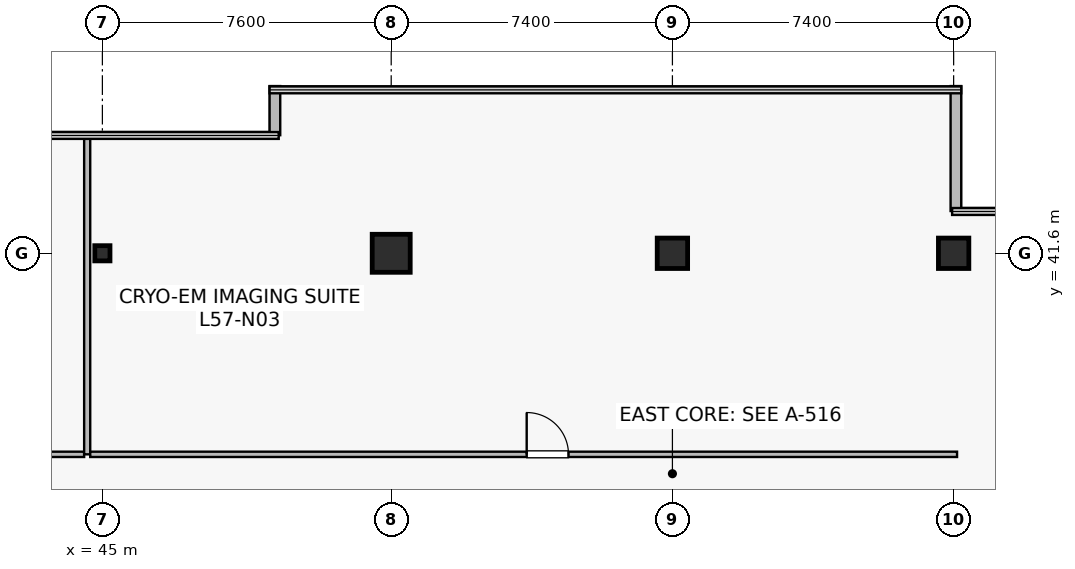
"""IFC4 building model, lengths in metres.
Left out: names, types, materials, properties, quantities, classifications, styles, units other than length and angle.
Written with IfcOpenShell. Run it as: python <this file> out.ifc"""

import sys

from ifc_helpers import new_model, si_unit, direction, frame, frame_2d, origin, origin_2d, place, context, subcontext, project, spatial, rectangle, hollow_rectangle, extrude, source, transform, mapped, element, fill, save


model = new_model("IFC4")
c1 = context("Model", 3, precision=1e-05, world=origin(), true_north=direction((0.0, 1.0)))
c2 = subcontext(c1, "Body", "Model", "MODEL_VIEW")
j1 = project(units=[si_unit("LENGTHUNIT", "METRE"), si_unit("PLANEANGLEUNIT", "RADIAN")], contexts=[c1])
p1 = place(None, origin())
s1 = spatial("IfcSite", under=j1, at=p1, CompositionType="ELEMENT")
p2 = place(p1, origin())
s2 = spatial("IfcBuilding", under=s1, at=p2, CompositionType="ELEMENT")
p3 = place(p2, frame((0.0, 0.0, 238.3)))
s3 = spatial("IfcBuildingStorey", under=s2, at=p3, CompositionType="ELEMENT", Elevation=238.3)
m1 = source(origin(), c2, "Body", "SweptSolid", [
    extrude(rectangle(XDim=1.0, YDim=1.0, at=origin_2d()), origin(), (0.0, 0.0, 1.0), 4.1),
])
p4 = place(p3, frame((52.6, 41.6, 0.0), z_axis=(0.0, 0.0, 1.0), x_axis=(1.0, 0.0, 0.0)))
e1 = element("IfcColumn", 1, at=p4, inside=s3, PredefinedType="COLUMN", context=c2, shape_type="MappedRepresentation", body=[
    mapped(m1, transform((0.0, 0.0, 0.0), scale=1.0)),
])
m2 = source(origin(), c2, "Body", "SweptSolid", [
    extrude(rectangle(XDim=0.8, YDim=0.8, at=origin_2d()), origin(), (0.0, 0.0, 1.0), 4.1),
])
for number, where, z_axis, x_axis in (
    (2, (60.0, 41.6, 0.0), (0.0, 0.0, 1.0), (1.0, 0.0, 0.0)),
    (3, (67.4, 41.6, 0.0), (0.0, 0.0, 1.0), (1.0, 0.0, 0.0)),
):
    element("IfcColumn", number, at=place(p3, frame(where, z_axis=z_axis, x_axis=x_axis)), inside=s3, PredefinedType="COLUMN", context=c2, shape_type="MappedRepresentation", body=[
        mapped(m2, transform((0.0, 0.0, 0.0), scale=1.0)),
    ])
m3 = source(origin(), c2, "Body", "SweptSolid", [
    extrude(hollow_rectangle(XDim=0.4, YDim=0.4, WallThickness=0.019, at=origin_2d()), origin(), (0.0, 0.0, 1.0), 4.1),
])
p5 = place(p3, frame((45.0, 41.6, 0.0), z_axis=(0.0, 0.0, 1.0), x_axis=(1.0, 0.0, 0.0)))
e4 = element("IfcColumn", 4, at=p5, inside=s3, PredefinedType="COLUMN", context=c2, shape_type="MappedRepresentation", body=[
    mapped(m3, transform((0.0, 0.0, 0.0), scale=1.0)),
])
p6 = place(p3, frame((67.46, 42.712, 0.0), z_axis=(0.0, 0.0, 1.0), x_axis=(0.0, 1.0, 0.0)))
e5 = element("IfcWall", 5, at=p6, inside=s3, PredefinedType="STANDARD", context=c2, shape_type="SweptSolid", body=[
    extrude(rectangle(XDim=3.288, YDim=0.28, at=frame_2d((1.644, 0.0))), origin(), (0.0, 0.0, 1.0), 3.8),
])
p7 = place(p3, frame((49.54, 46.0, 0.0), z_axis=(0.0, 0.0, 1.0), x_axis=(0.0, -1.0, 0.0)))
e6 = element("IfcWall", 6, at=p7, inside=s3, PredefinedType="STANDARD", context=c2, shape_type="SweptSolid", body=[
    extrude(rectangle(XDim=1.293, YDim=0.28, at=frame_2d((0.646, 0.0))), origin(), (0.0, 0.0, 1.0), 3.8),
])
p8 = place(p3, frame((21.28, 36.31, 0.0), z_axis=(0.0, 0.0, 1.0), x_axis=(1.0, 0.0, 0.0)))
e7 = element("IfcWall", 7, at=p8, inside=s3, PredefinedType="PARTITIONING", context=c2, shape_type="SweptSolid", body=[
    extrude(rectangle(XDim=23.24, YDim=0.14, at=frame_2d((11.62, 0.0))), origin(), (0.0, 0.0, 1.0), 3.197),
])
p9 = place(p8, frame((9.14, 0.0, 0.0)))
e8 = element("IfcOpeningElement", 8, at=p9, cuts=e7, PredefinedType="OPENING", context=c2, shape_type="SweptSolid", body=[
    extrude(rectangle(XDim=1.1, YDim=2.18, at=frame_2d((0.55, 1.09))), frame((0.0, 0.08, 0.0), z_axis=(0.0, -1.0, 0.0), x_axis=(1.0, 0.0, 0.0)), (0.0, 0.0, 1.0), 0.16),
])
p10 = place(p3, frame((44.6, 36.31, 0.0), z_axis=(0.0, 0.0, 1.0), x_axis=(0.0, 1.0, 0.0)))
e9 = element("IfcWall", 9, at=p10, inside=s3, PredefinedType="PARTITIONING", context=c2, shape_type="SweptSolid", body=[
    extrude(rectangle(XDim=8.38, YDim=0.16, at=frame_2d((4.19, 0.0))), origin(), (0.0, 0.0, 1.0), 3.135),
])
p11 = place(p3, frame((44.68, 36.31, 0.0), z_axis=(0.0, 0.0, 1.0), x_axis=(1.0, 0.0, 0.0)))
e10 = element("IfcWall", 10, at=p11, inside=s3, PredefinedType="PARTITIONING", context=c2, shape_type="SweptSolid", body=[
    extrude(rectangle(XDim=22.81, YDim=0.14, at=frame_2d((11.405, 0.0))), origin(), (0.0, 0.0, 1.0), 3.197),
])
p12 = place(p11, frame((11.485, 0.0, 0.0)))
e11 = element("IfcOpeningElement", 11, at=p12, cuts=e10, PredefinedType="OPENING", context=c2, shape_type="SweptSolid", body=[
    extrude(rectangle(XDim=1.1, YDim=2.18, at=frame_2d((0.55, 1.09))), frame((0.0, 0.08, 0.0), z_axis=(0.0, -1.0, 0.0), x_axis=(1.0, 0.0, 0.0)), (0.0, 0.0, 1.0), 0.16),
])
m4 = source(origin(), c2, "Body", "SweptSolid", [
    extrude(rectangle(XDim=1.1, YDim=2.18, at=frame_2d((0.55, 1.09))), frame((0.0, 0.025, 0.0), z_axis=(0.0, -1.0, 0.0), x_axis=(1.0, 0.0, 0.0)), (0.0, 0.0, 1.0), 0.05),
])
p13 = place(p12, origin())
e12 = element("IfcDoor", 12, at=p13, inside=s3, OperationType="SINGLE_SWING_LEFT", PredefinedType="DOOR", context=c2, shape_type="MappedRepresentation", body=[
    mapped(m4, transform((0.0, 0.0, 0.0), scale=1.0)),
])
fill(e11, e12)
save(model, sys.argv[1])
